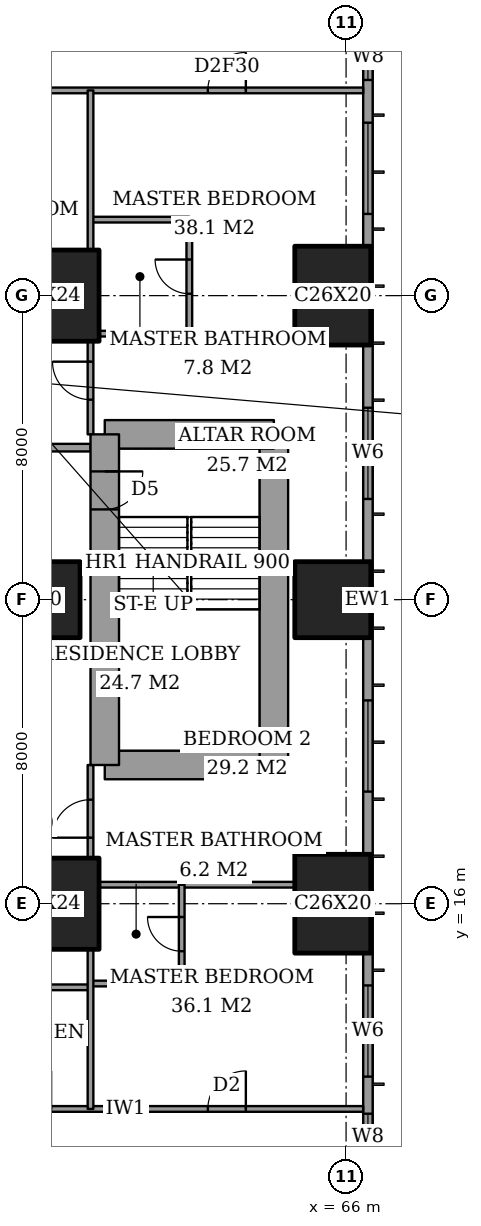
"""IFC4 building model, lengths in metres.
Left out: names, types, materials, properties, quantities, classifications, styles, units other than length and angle.
Written with IfcOpenShell. Run it as: python <this file> out.ifc"""

import sys

from ifc_helpers import new_model, si_unit, direction, frame, frame_2d, origin, origin_2d, place, context, subcontext, project, spatial, rectangle, extrude, element, fill, save


model = new_model("IFC4")
c1 = context("Model", 3, precision=1e-05, world=origin(), true_north=direction((0.0, 1.0)))
c2 = subcontext(c1, "Body", "Model", "MODEL_VIEW")
j1 = project(units=[si_unit("LENGTHUNIT", "METRE"), si_unit("PLANEANGLEUNIT", "RADIAN")], contexts=[c1])
p1 = place(None, origin())
s1 = spatial("IfcSite", under=j1, at=p1, CompositionType="ELEMENT")
p2 = place(p1, origin())
s2 = spatial("IfcBuilding", under=s1, at=p2, CompositionType="ELEMENT")
p3 = place(p2, frame((0.0, 0.0, 29.6)))
s3 = spatial("IfcBuildingStorey", under=s2, at=p3, CompositionType="ELEMENT", Elevation=29.6)
p4 = place(p3, frame((58.0, 16.0, 0.0), z_axis=(0.0, 0.0, 1.0), x_axis=(1.0, 0.0, 0.0)))
e1 = element("IfcColumn", 1, at=p4, inside=s3, PredefinedType="COLUMN", context=c2, shape_type="SweptSolid", body=[
    extrude(rectangle(XDim=3.0, YDim=2.4, at=origin_2d()), origin(), (0.0, 0.0, 1.0), 3.6),
])
p5 = place(p3, frame((58.0, 24.0, 0.0), z_axis=(0.0, 0.0, 1.0), x_axis=(1.0, 0.0, 0.0)))
e2 = element("IfcColumn", 2, at=p5, inside=s3, PredefinedType="COLUMN", context=c2, shape_type="SweptSolid", body=[
    extrude(rectangle(XDim=2.0, YDim=2.0, at=origin_2d()), origin(), (0.0, 0.0, 1.0), 3.6),
])
p6 = place(p3, frame((58.0, 32.0, 0.0), z_axis=(0.0, 0.0, 1.0), x_axis=(1.0, 0.0, 0.0)))
e3 = element("IfcColumn", 3, at=p6, inside=s3, PredefinedType="COLUMN", context=c2, shape_type="SweptSolid", body=[
    extrude(rectangle(XDim=3.0, YDim=2.4, at=origin_2d()), origin(), (0.0, 0.0, 1.0), 3.6),
])
p7 = place(p3, frame((65.65, 16.0, 0.0), z_axis=(0.0, 0.0, 1.0), x_axis=(0.0, 1.0, 0.0)))
e4 = element("IfcColumn", 4, at=p7, inside=s3, PredefinedType="COLUMN", context=c2, shape_type="SweptSolid", body=[
    extrude(rectangle(XDim=2.6, YDim=2.0, at=origin_2d()), origin(), (0.0, 0.0, 1.0), 3.6),
])
p8 = place(p3, frame((65.65, 24.0, 0.0), z_axis=(0.0, 0.0, 1.0), x_axis=(1.0, 0.0, 0.0)))
e5 = element("IfcColumn", 5, at=p8, inside=s3, PredefinedType="COLUMN", context=c2, shape_type="SweptSolid", body=[
    extrude(rectangle(XDim=2.0, YDim=2.0, at=origin_2d()), origin(), (0.0, 0.0, 1.0), 3.6),
])
p9 = place(p3, frame((65.65, 32.0, 0.0), z_axis=(0.0, 0.0, 1.0), x_axis=(0.0, 1.0, 0.0)))
e6 = element("IfcColumn", 6, at=p9, inside=s3, PredefinedType="COLUMN", context=c2, shape_type="SweptSolid", body=[
    extrude(rectangle(XDim=2.6, YDim=2.0, at=origin_2d()), origin(), (0.0, 0.0, 1.0), 3.6),
])
p10 = place(p3, frame((59.65, 19.65, 0.0), z_axis=(0.0, 0.0, 1.0), x_axis=(1.0, 0.0, 0.0)))
e7 = element("IfcWall", 7, at=p10, inside=s3, PredefinedType="SHEAR", context=c2, shape_type="SweptSolid", body=[
    extrude(rectangle(XDim=4.45, YDim=0.75, at=frame_2d((2.225, 0.0))), origin(), (0.0, 0.0, 1.0), 3.6),
])
p11 = place(p3, frame((64.1, 19.65, 0.0), z_axis=(0.0, 0.0, 1.0), x_axis=(0.0, 1.0, 0.0)))
e8 = element("IfcWall", 8, at=p11, inside=s3, PredefinedType="SHEAR", context=c2, shape_type="SweptSolid", body=[
    extrude(rectangle(XDim=8.7, YDim=0.75, at=frame_2d((4.35, 0.0))), origin(), (0.0, 0.0, 1.0), 3.6),
])
p12 = place(p3, frame((64.1, 28.35, 0.0), z_axis=(0.0, 0.0, 1.0), x_axis=(-1.0, 0.0, 0.0)))
e9 = element("IfcWall", 9, at=p12, inside=s3, PredefinedType="SHEAR", context=c2, shape_type="SweptSolid", body=[
    extrude(rectangle(XDim=4.45, YDim=0.75, at=frame_2d((2.225, 0.0))), origin(), (0.0, 0.0, 1.0), 3.6),
])
p13 = place(p3, frame((59.65, 28.35, 0.0), z_axis=(0.0, 0.0, 1.0), x_axis=(0.0, -1.0, 0.0)))
e10 = element("IfcWall", 10, at=p13, inside=s3, PredefinedType="SHEAR", context=c2, shape_type="SweptSolid", body=[
    extrude(rectangle(XDim=8.7, YDim=0.75, at=frame_2d((4.35, 0.0))), origin(), (0.0, 0.0, 1.0), 3.6),
])
p14 = place(p13, frame((0.975, 0.0, 0.0)))
e11 = element("IfcOpeningElement", 11, at=p14, cuts=e10, PredefinedType="OPENING", context=c2, shape_type="SweptSolid", body=[
    extrude(rectangle(XDim=1.0, YDim=2.1, at=frame_2d((0.5, 1.05))), frame((0.0, 0.385, 0.0), z_axis=(0.0, -1.0, 0.0), x_axis=(1.0, 0.0, 0.0)), (0.0, 0.0, 1.0), 0.77),
])
p15 = place(p3, frame((66.575, 3.175, 0.0), z_axis=(0.0, 0.0, 1.0), x_axis=(0.0, 1.0, 0.0)))
e12 = element("IfcWall", 12, at=p15, inside=s3, PredefinedType="SOLIDWALL", context=c2, shape_type="SweptSolid", body=[
    extrude(rectangle(XDim=41.65, YDim=0.25, at=frame_2d((20.825, 0.0))), origin(), (0.0, 0.0, 1.0), 3.6),
])
p16 = place(p15, frame((0.775, 0.0, 0.6)))
e13 = element("IfcOpeningElement", 13, at=p16, cuts=e12, PredefinedType="OPENING", context=c2, shape_type="SweptSolid", body=[
    extrude(rectangle(XDim=2.4, YDim=2.0, at=frame_2d((1.2, 1.0))), frame((0.0, 0.135, 0.0), z_axis=(0.0, -1.0, 0.0), x_axis=(1.0, 0.0, 0.0)), (0.0, 0.0, 1.0), 0.27),
])
p17 = place(p15, frame((6.1, 0.0, 0.6)))
e14 = element("IfcOpeningElement", 14, at=p17, cuts=e12, PredefinedType="OPENING", context=c2, shape_type="SweptSolid", body=[
    extrude(rectangle(XDim=1.2, YDim=2.0, at=frame_2d((0.6, 1.0))), frame((0.0, 0.135, 0.0), z_axis=(0.0, -1.0, 0.0), x_axis=(1.0, 0.0, 0.0)), (0.0, 0.0, 1.0), 0.27),
])
p18 = place(p15, frame((8.275, 0.0, 0.6)))
e15 = element("IfcOpeningElement", 15, at=p18, cuts=e12, PredefinedType="OPENING", context=c2, shape_type="SweptSolid", body=[
    extrude(rectangle(XDim=2.4, YDim=2.0, at=frame_2d((1.2, 1.0))), frame((0.0, 0.135, 0.0), z_axis=(0.0, -1.0, 0.0), x_axis=(1.0, 0.0, 0.0)), (0.0, 0.0, 1.0), 0.27),
])
p19 = place(p15, frame((15.775, 0.0, 0.6)))
e16 = element("IfcOpeningElement", 16, at=p19, cuts=e12, PredefinedType="OPENING", context=c2, shape_type="SweptSolid", body=[
    extrude(rectangle(XDim=2.4, YDim=2.0, at=frame_2d((1.2, 1.0))), frame((0.0, 0.135, 0.0), z_axis=(0.0, -1.0, 0.0), x_axis=(1.0, 0.0, 0.0)), (0.0, 0.0, 1.0), 0.27),
])
p20 = place(p15, frame((23.475, 0.0, 0.6)))
e17 = element("IfcOpeningElement", 17, at=p20, cuts=e12, PredefinedType="OPENING", context=c2, shape_type="SweptSolid", body=[
    extrude(rectangle(XDim=2.4, YDim=2.0, at=frame_2d((1.2, 1.0))), frame((0.0, 0.135, 0.0), z_axis=(0.0, -1.0, 0.0), x_axis=(1.0, 0.0, 0.0)), (0.0, 0.0, 1.0), 0.27),
])
p21 = place(p15, frame((30.975, 0.0, 0.6)))
e18 = element("IfcOpeningElement", 18, at=p21, cuts=e12, PredefinedType="OPENING", context=c2, shape_type="SweptSolid", body=[
    extrude(rectangle(XDim=2.4, YDim=2.0, at=frame_2d((1.2, 1.0))), frame((0.0, 0.135, 0.0), z_axis=(0.0, -1.0, 0.0), x_axis=(1.0, 0.0, 0.0)), (0.0, 0.0, 1.0), 0.27),
])
p22 = place(p15, frame((34.5, 0.0, 0.6)))
e19 = element("IfcOpeningElement", 19, at=p22, cuts=e12, PredefinedType="OPENING", context=c2, shape_type="SweptSolid", body=[
    extrude(rectangle(XDim=1.2, YDim=2.0, at=frame_2d((0.6, 1.0))), frame((0.0, 0.135, 0.0), z_axis=(0.0, -1.0, 0.0), x_axis=(1.0, 0.0, 0.0)), (0.0, 0.0, 1.0), 0.27),
])
p23 = place(p15, frame((38.475, 0.0, 0.6)))
e20 = element("IfcOpeningElement", 20, at=p23, cuts=e12, PredefinedType="OPENING", context=c2, shape_type="SweptSolid", body=[
    extrude(rectangle(XDim=2.4, YDim=2.0, at=frame_2d((1.2, 1.0))), frame((0.0, 0.135, 0.0), z_axis=(0.0, -1.0, 0.0), x_axis=(1.0, 0.0, 0.0)), (0.0, 0.0, 1.0), 0.27),
])
p24 = place(p3, frame((41.439, 10.6, 0.0), z_axis=(0.0, 0.0, 1.0), x_axis=(1.0, 0.0, 0.0)))
e21 = element("IfcWall", 21, at=p24, inside=s3, PredefinedType="PARTITIONING", context=c2, shape_type="SweptSolid", body=[
    extrude(rectangle(XDim=25.011, YDim=0.15, at=frame_2d((12.505, 0.0))), origin(), (0.0, 0.0, 1.0), 3.35),
])
p25 = place(p24, frame((10.761, 0.0, 0.0)))
e22 = element("IfcOpeningElement", 22, at=p25, cuts=e21, PredefinedType="OPENING", context=c2, shape_type="SweptSolid", body=[
    extrude(rectangle(XDim=1.0, YDim=2.1, at=frame_2d((0.5, 1.05))), frame((0.0, 0.085, 0.0), z_axis=(0.0, -1.0, 0.0), x_axis=(1.0, 0.0, 0.0)), (0.0, 0.0, 1.0), 0.17),
])
p26 = place(p24, frame((20.924, 0.0, 0.0)))
e23 = element("IfcOpeningElement", 23, at=p26, cuts=e21, PredefinedType="OPENING", context=c2, shape_type="SweptSolid", body=[
    extrude(rectangle(XDim=1.0, YDim=2.1, at=frame_2d((0.5, 1.05))), frame((0.0, 0.085, 0.0), z_axis=(0.0, -1.0, 0.0), x_axis=(1.0, 0.0, 0.0)), (0.0, 0.0, 1.0), 0.17),
])
p27 = place(p24, frame((15.799, 0.0, 0.0)))
e24 = element("IfcOpeningElement", 24, at=p27, cuts=e21, PredefinedType="OPENING", context=c2, shape_type="SweptSolid", body=[
    extrude(rectangle(XDim=1.0, YDim=2.1, at=frame_2d((0.5, 1.05))), frame((0.0, 0.085, 0.0), z_axis=(0.0, -1.0, 0.0), x_axis=(1.0, 0.0, 0.0)), (0.0, 0.0, 1.0), 0.17),
])
p28 = place(p24, frame((13.061, 0.0, 0.0)))
e25 = element("IfcOpeningElement", 25, at=p28, cuts=e21, PredefinedType="OPENING", context=c2, shape_type="SweptSolid", body=[
    extrude(rectangle(XDim=1.0, YDim=2.1, at=frame_2d((0.5, 1.05))), frame((0.0, 0.085, 0.0), z_axis=(0.0, -1.0, 0.0), x_axis=(1.0, 0.0, 0.0)), (0.0, 0.0, 1.0), 0.17),
])
p29 = place(p24, frame((7.911, 0.0, 0.0)))
e26 = element("IfcOpeningElement", 26, at=p29, cuts=e21, PredefinedType="OPENING", context=c2, shape_type="SweptSolid", body=[
    extrude(rectangle(XDim=0.9, YDim=2.1, at=frame_2d((0.45, 1.05))), frame((0.0, 0.085, 0.0), z_axis=(0.0, -1.0, 0.0), x_axis=(1.0, 0.0, 0.0)), (0.0, 0.0, 1.0), 0.17),
])
p30 = place(p24, frame((2.836, 0.0, 0.0)))
e27 = element("IfcOpeningElement", 27, at=p30, cuts=e21, PredefinedType="OPENING", context=c2, shape_type="SweptSolid", body=[
    extrude(rectangle(XDim=1.0, YDim=2.1, at=frame_2d((0.5, 1.05))), frame((0.0, 0.085, 0.0), z_axis=(0.0, -1.0, 0.0), x_axis=(1.0, 0.0, 0.0)), (0.0, 0.0, 1.0), 0.17),
])
p31 = place(p3, frame((56.2, 13.8, 0.0), z_axis=(0.0, 0.0, 1.0), x_axis=(1.0, 0.0, 0.0)))
e28 = element("IfcWall", 28, at=p31, inside=s3, PredefinedType="PARTITIONING", context=c2, shape_type="SweptSolid", body=[
    extrude(rectangle(XDim=3.075, YDim=0.15, at=frame_2d((1.538, 0.0))), origin(), (0.0, 0.0, 1.0), 3.35),
])
p32 = place(p3, frame((59.275, 13.9, 0.0), z_axis=(0.0, 0.0, 1.0), x_axis=(1.0, 0.0, 0.0)))
e29 = element("IfcWall", 29, at=p32, inside=s3, PredefinedType="PARTITIONING", context=c2, shape_type="SweptSolid", body=[
    extrude(rectangle(XDim=2.4, YDim=0.15, at=frame_2d((1.2, 0.0))), origin(), (0.0, 0.0, 1.0), 3.35),
])
p33 = place(p3, frame((59.5, 16.5, 0.0), z_axis=(0.0, 0.0, 1.0), x_axis=(1.0, 0.0, 0.0)))
e30 = element("IfcWall", 30, at=p33, inside=s3, PredefinedType="PARTITIONING", context=c2, shape_type="SweptSolid", body=[
    extrude(rectangle(XDim=5.15, YDim=0.15, at=frame_2d((2.575, 0.0))), origin(), (0.0, 0.0, 1.0), 3.35),
])
p34 = place(p3, frame((42.0, 28.0, 0.0), z_axis=(0.0, 0.0, 1.0), x_axis=(1.0, 0.0, 0.0)))
e31 = element("IfcWall", 31, at=p34, inside=s3, PredefinedType="PARTITIONING", context=c2, shape_type="SweptSolid", body=[
    extrude(rectangle(XDim=17.275, YDim=0.2, at=frame_2d((8.637, 0.0))), origin(), (0.0, 0.0, 1.0), 3.35),
])
p35 = place(p34, frame((8.9, 0.0, 0.0)))
e32 = element("IfcOpeningElement", 32, at=p35, cuts=e31, PredefinedType="OPENING", context=c2, shape_type="SweptSolid", body=[
    extrude(rectangle(XDim=1.2, YDim=2.4, at=frame_2d((0.6, 1.2))), frame((0.0, 0.11, 0.0), z_axis=(0.0, -1.0, 0.0), x_axis=(1.0, 0.0, 0.0)), (0.0, 0.0, 1.0), 0.22),
])
p36 = place(p3, frame((59.5, 31.0, 0.0), z_axis=(0.0, 0.0, 1.0), x_axis=(1.0, 0.0, 0.0)))
e33 = element("IfcWall", 33, at=p36, inside=s3, PredefinedType="PARTITIONING", context=c2, shape_type="SweptSolid", body=[
    extrude(rectangle(XDim=5.15, YDim=0.15, at=frame_2d((2.575, 0.0))), origin(), (0.0, 0.0, 1.0), 3.35),
])
p37 = place(p3, frame((59.275, 34.0, 0.0), z_axis=(0.0, 0.0, 1.0), x_axis=(1.0, 0.0, 0.0)))
e34 = element("IfcWall", 34, at=p37, inside=s3, PredefinedType="PARTITIONING", context=c2, shape_type="SweptSolid", body=[
    extrude(rectangle(XDim=2.6, YDim=0.15, at=frame_2d((1.3, 0.0))), origin(), (0.0, 0.0, 1.0), 3.35),
])
p38 = place(p3, frame((41.439, 37.4, 0.0), z_axis=(0.0, 0.0, 1.0), x_axis=(1.0, 0.0, 0.0)))
e35 = element("IfcWall", 35, at=p38, inside=s3, PredefinedType="PARTITIONING", context=c2, shape_type="SweptSolid", body=[
    extrude(rectangle(XDim=25.011, YDim=0.15, at=frame_2d((12.505, 0.0))), origin(), (0.0, 0.0, 1.0), 3.35),
])
p39 = place(p38, frame((11.961, 0.0, 0.0)))
e36 = element("IfcOpeningElement", 36, at=p39, cuts=e35, PredefinedType="OPENING", context=c2, shape_type="SweptSolid", body=[
    extrude(rectangle(XDim=1.0, YDim=2.1, at=frame_2d((0.5, 1.05))), frame((0.0, 0.085, 0.0), z_axis=(0.0, -1.0, 0.0), x_axis=(1.0, 0.0, 0.0)), (0.0, 0.0, 1.0), 0.17),
])
p40 = place(p38, frame((20.924, 0.0, 0.0)))
e37 = element("IfcOpeningElement", 37, at=p40, cuts=e35, PredefinedType="OPENING", context=c2, shape_type="SweptSolid", body=[
    extrude(rectangle(XDim=1.0, YDim=2.1, at=frame_2d((0.5, 1.05))), frame((0.0, 0.085, 0.0), z_axis=(0.0, -1.0, 0.0), x_axis=(1.0, 0.0, 0.0)), (0.0, 0.0, 1.0), 0.17),
])
p41 = place(p38, frame((15.249, 0.0, 0.0)))
e38 = element("IfcOpeningElement", 38, at=p41, cuts=e35, PredefinedType="OPENING", context=c2, shape_type="SweptSolid", body=[
    extrude(rectangle(XDim=0.9, YDim=2.1, at=frame_2d((0.45, 1.05))), frame((0.0, 0.085, 0.0), z_axis=(0.0, -1.0, 0.0), x_axis=(1.0, 0.0, 0.0)), (0.0, 0.0, 1.0), 0.17),
])
p42 = place(p38, frame((9.561, 0.0, 0.0)))
e39 = element("IfcOpeningElement", 39, at=p42, cuts=e35, PredefinedType="OPENING", context=c2, shape_type="SweptSolid", body=[
    extrude(rectangle(XDim=1.0, YDim=2.1, at=frame_2d((0.5, 1.05))), frame((0.0, 0.085, 0.0), z_axis=(0.0, -1.0, 0.0), x_axis=(1.0, 0.0, 0.0)), (0.0, 0.0, 1.0), 0.17),
])
p43 = place(p38, frame((7.161, 0.0, 0.0)))
e40 = element("IfcOpeningElement", 40, at=p43, cuts=e35, PredefinedType="OPENING", context=c2, shape_type="SweptSolid", body=[
    extrude(rectangle(XDim=1.0, YDim=2.1, at=frame_2d((0.5, 1.05))), frame((0.0, 0.085, 0.0), z_axis=(0.0, -1.0, 0.0), x_axis=(1.0, 0.0, 0.0)), (0.0, 0.0, 1.0), 0.17),
])
p44 = place(p38, frame((2.836, 0.0, 0.0)))
e41 = element("IfcOpeningElement", 41, at=p44, cuts=e35, PredefinedType="OPENING", context=c2, shape_type="SweptSolid", body=[
    extrude(rectangle(XDim=1.0, YDim=2.1, at=frame_2d((0.5, 1.05))), frame((0.0, 0.085, 0.0), z_axis=(0.0, -1.0, 0.0), x_axis=(1.0, 0.0, 0.0)), (0.0, 0.0, 1.0), 0.17),
])
p45 = place(p3, frame((59.275, 10.6, 0.0), z_axis=(0.0, 0.0, 1.0), x_axis=(0.0, 1.0, 0.0)))
e42 = element("IfcWall", 42, at=p45, inside=s3, PredefinedType="PARTITIONING", context=c2, shape_type="SweptSolid", body=[
    extrude(rectangle(XDim=4.2, YDim=0.15, at=frame_2d((2.1, 0.0))), origin(), (0.0, 0.0, 1.0), 3.35),
])
p46 = place(p3, frame((59.275, 17.2, 0.0), z_axis=(0.0, 0.0, 1.0), x_axis=(0.0, 1.0, 0.0)))
e43 = element("IfcWall", 43, at=p46, inside=s3, PredefinedType="PARTITIONING", context=c2, shape_type="SweptSolid", body=[
    extrude(rectangle(XDim=2.45, YDim=0.15, at=frame_2d((1.225, 0.0))), origin(), (0.0, 0.0, 1.0), 3.35),
])
p47 = place(p46, frame((0.538, 0.0, 0.0)))
e44 = element("IfcOpeningElement", 44, at=p47, cuts=e43, PredefinedType="OPENING", context=c2, shape_type="SweptSolid", body=[
    extrude(rectangle(XDim=1.0, YDim=2.1, at=frame_2d((0.5, 1.05))), frame((0.0, 0.085, 0.0), z_axis=(0.0, -1.0, 0.0), x_axis=(1.0, 0.0, 0.0)), (0.0, 0.0, 1.0), 0.17),
])
p48 = place(p3, frame((59.275, 28.35, 0.0), z_axis=(0.0, 0.0, 1.0), x_axis=(0.0, 1.0, 0.0)))
e45 = element("IfcWall", 45, at=p48, inside=s3, PredefinedType="PARTITIONING", context=c2, shape_type="SweptSolid", body=[
    extrude(rectangle(XDim=2.45, YDim=0.15, at=frame_2d((1.225, 0.0))), origin(), (0.0, 0.0, 1.0), 3.35),
])
p49 = place(p48, frame((0.913, 0.0, 0.0)))
e46 = element("IfcOpeningElement", 46, at=p49, cuts=e45, PredefinedType="OPENING", context=c2, shape_type="SweptSolid", body=[
    extrude(rectangle(XDim=1.0, YDim=2.1, at=frame_2d((0.5, 1.05))), frame((0.0, 0.085, 0.0), z_axis=(0.0, -1.0, 0.0), x_axis=(1.0, 0.0, 0.0)), (0.0, 0.0, 1.0), 0.17),
])
p50 = place(p3, frame((59.275, 33.2, 0.0), z_axis=(0.0, 0.0, 1.0), x_axis=(0.0, 1.0, 0.0)))
e47 = element("IfcWall", 47, at=p50, inside=s3, PredefinedType="PARTITIONING", context=c2, shape_type="SweptSolid", body=[
    extrude(rectangle(XDim=4.2, YDim=0.15, at=frame_2d((2.1, 0.0))), origin(), (0.0, 0.0, 1.0), 3.35),
])
p51 = place(p3, frame((61.675, 13.9, 0.0), z_axis=(0.0, 0.0, 1.0), x_axis=(0.0, 1.0, 0.0)))
e48 = element("IfcWall", 48, at=p51, inside=s3, PredefinedType="PARTITIONING", context=c2, shape_type="SweptSolid", body=[
    extrude(rectangle(XDim=2.6, YDim=0.15, at=frame_2d((1.3, 0.0))), origin(), (0.0, 0.0, 1.0), 3.35),
])
p52 = place(p51, frame((0.85, 0.0, 0.0)))
e49 = element("IfcOpeningElement", 49, at=p52, cuts=e48, PredefinedType="OPENING", context=c2, shape_type="SweptSolid", body=[
    extrude(rectangle(XDim=0.9, YDim=2.1, at=frame_2d((0.45, 1.05))), frame((0.0, 0.085, 0.0), z_axis=(0.0, -1.0, 0.0), x_axis=(1.0, 0.0, 0.0)), (0.0, 0.0, 1.0), 0.17),
])
p53 = place(p3, frame((61.875, 31.0, 0.0), z_axis=(0.0, 0.0, 1.0), x_axis=(0.0, 1.0, 0.0)))
e50 = element("IfcWall", 50, at=p53, inside=s3, PredefinedType="PARTITIONING", context=c2, shape_type="SweptSolid", body=[
    extrude(rectangle(XDim=3.0, YDim=0.15, at=frame_2d((1.5, 0.0))), origin(), (0.0, 0.0, 1.0), 3.35),
])
p54 = place(p53, frame((1.05, 0.0, 0.0)))
e51 = element("IfcOpeningElement", 51, at=p54, cuts=e50, PredefinedType="OPENING", context=c2, shape_type="SweptSolid", body=[
    extrude(rectangle(XDim=0.9, YDim=2.1, at=frame_2d((0.45, 1.05))), frame((0.0, 0.085, 0.0), z_axis=(0.0, -1.0, 0.0), x_axis=(1.0, 0.0, 0.0)), (0.0, 0.0, 1.0), 0.17),
])
p55 = place(p17, origin())
e52 = element("IfcWindow", 52, at=p55, inside=s3, PartitioningType="SINGLE_PANEL", PredefinedType="WINDOW", context=c2, shape_type="SweptSolid", body=[
    extrude(rectangle(XDim=1.2, YDim=2.0, at=frame_2d((0.6, 1.0))), frame((0.0, 0.03, 0.0), z_axis=(0.0, -1.0, 0.0), x_axis=(1.0, 0.0, 0.0)), (0.0, 0.0, 1.0), 0.06),
])
fill(e14, e52)
p56 = place(p18, origin())
e53 = element("IfcWindow", 53, at=p56, inside=s3, PartitioningType="SINGLE_PANEL", PredefinedType="WINDOW", context=c2, shape_type="SweptSolid", body=[
    extrude(rectangle(XDim=2.4, YDim=2.0, at=frame_2d((1.2, 1.0))), frame((0.0, 0.03, 0.0), z_axis=(0.0, -1.0, 0.0), x_axis=(1.0, 0.0, 0.0)), (0.0, 0.0, 1.0), 0.06),
])
fill(e15, e53)
p57 = place(p19, origin())
e54 = element("IfcWindow", 54, at=p57, inside=s3, PartitioningType="SINGLE_PANEL", PredefinedType="WINDOW", context=c2, shape_type="SweptSolid", body=[
    extrude(rectangle(XDim=2.4, YDim=2.0, at=frame_2d((1.2, 1.0))), frame((0.0, 0.03, 0.0), z_axis=(0.0, -1.0, 0.0), x_axis=(1.0, 0.0, 0.0)), (0.0, 0.0, 1.0), 0.06),
])
fill(e16, e54)
p58 = place(p20, origin())
e55 = element("IfcWindow", 55, at=p58, inside=s3, PartitioningType="SINGLE_PANEL", PredefinedType="WINDOW", context=c2, shape_type="SweptSolid", body=[
    extrude(rectangle(XDim=2.4, YDim=2.0, at=frame_2d((1.2, 1.0))), frame((0.0, 0.03, 0.0), z_axis=(0.0, -1.0, 0.0), x_axis=(1.0, 0.0, 0.0)), (0.0, 0.0, 1.0), 0.06),
])
fill(e17, e55)
p59 = place(p21, origin())
e56 = element("IfcWindow", 56, at=p59, inside=s3, PartitioningType="SINGLE_PANEL", PredefinedType="WINDOW", context=c2, shape_type="SweptSolid", body=[
    extrude(rectangle(XDim=2.4, YDim=2.0, at=frame_2d((1.2, 1.0))), frame((0.0, 0.03, 0.0), z_axis=(0.0, -1.0, 0.0), x_axis=(1.0, 0.0, 0.0)), (0.0, 0.0, 1.0), 0.06),
])
fill(e18, e56)
p60 = place(p22, origin())
e57 = element("IfcWindow", 57, at=p60, inside=s3, PartitioningType="SINGLE_PANEL", PredefinedType="WINDOW", context=c2, shape_type="SweptSolid", body=[
    extrude(rectangle(XDim=1.2, YDim=2.0, at=frame_2d((0.6, 1.0))), frame((0.0, 0.03, 0.0), z_axis=(0.0, -1.0, 0.0), x_axis=(1.0, 0.0, 0.0)), (0.0, 0.0, 1.0), 0.06),
])
fill(e19, e57)
p61 = place(p52, origin())
e58 = element("IfcDoor", 58, at=p61, inside=s3, OperationType="SINGLE_SWING_LEFT", PredefinedType="DOOR", context=c2, shape_type="SweptSolid", body=[
    extrude(rectangle(XDim=0.9, YDim=2.1, at=frame_2d((0.45, 1.05))), frame((0.0, 0.025, 0.0), z_axis=(0.0, -1.0, 0.0), x_axis=(1.0, 0.0, 0.0)), (0.0, 0.0, 1.0), 0.05),
])
fill(e49, e58)
p62 = place(p26, origin())
e59 = element("IfcDoor", 59, at=p62, inside=s3, OperationType="SINGLE_SWING_LEFT", PredefinedType="DOOR", context=c2, shape_type="SweptSolid", body=[
    extrude(rectangle(XDim=1.0, YDim=2.1, at=frame_2d((0.5, 1.05))), frame((0.0, 0.025, 0.0), z_axis=(0.0, -1.0, 0.0), x_axis=(1.0, 0.0, 0.0)), (0.0, 0.0, 1.0), 0.05),
])
fill(e23, e59)
p63 = place(p47, origin())
e60 = element("IfcDoor", 60, at=p63, inside=s3, OperationType="SINGLE_SWING_RIGHT", PredefinedType="DOOR", context=c2, shape_type="SweptSolid", body=[
    extrude(rectangle(XDim=1.0, YDim=2.1, at=frame_2d((0.5, 1.05))), frame((0.0, 0.025, 0.0), z_axis=(0.0, -1.0, 0.0), x_axis=(1.0, 0.0, 0.0)), (0.0, 0.0, 1.0), 0.05),
])
fill(e44, e60)
p64 = place(p54, origin())
e61 = element("IfcDoor", 61, at=p64, inside=s3, OperationType="SINGLE_SWING_LEFT", PredefinedType="DOOR", context=c2, shape_type="SweptSolid", body=[
    extrude(rectangle(XDim=0.9, YDim=2.1, at=frame_2d((0.45, 1.05))), frame((0.0, 0.025, 0.0), z_axis=(0.0, -1.0, 0.0), x_axis=(1.0, 0.0, 0.0)), (0.0, 0.0, 1.0), 0.05),
])
fill(e51, e61)
p65 = place(p40, origin())
e62 = element("IfcDoor", 62, at=p65, inside=s3, OperationType="SINGLE_SWING_LEFT", PredefinedType="DOOR", context=c2, shape_type="SweptSolid", body=[
    extrude(rectangle(XDim=1.0, YDim=2.1, at=frame_2d((0.5, 1.05))), frame((0.0, 0.025, 0.0), z_axis=(0.0, -1.0, 0.0), x_axis=(1.0, 0.0, 0.0)), (0.0, 0.0, 1.0), 0.05),
])
fill(e37, e62)
p66 = place(p49, origin())
e63 = element("IfcDoor", 63, at=p66, inside=s3, OperationType="SINGLE_SWING_LEFT", PredefinedType="DOOR", context=c2, shape_type="SweptSolid", body=[
    extrude(rectangle(XDim=1.0, YDim=2.1, at=frame_2d((0.5, 1.05))), frame((0.0, 0.025, 0.0), z_axis=(0.0, -1.0, 0.0), x_axis=(1.0, 0.0, 0.0)), (0.0, 0.0, 1.0), 0.05),
])
fill(e46, e63)
p67 = place(p14, origin())
e64 = element("IfcDoor", 64, at=p67, inside=s3, OperationType="SINGLE_SWING_RIGHT", PredefinedType="DOOR", context=c2, shape_type="SweptSolid", body=[
    extrude(rectangle(XDim=1.0, YDim=2.1, at=frame_2d((0.5, 1.05))), frame((0.0, 0.025, 0.0), z_axis=(0.0, -1.0, 0.0), x_axis=(1.0, 0.0, 0.0)), (0.0, 0.0, 1.0), 0.05),
])
fill(e11, e64)
save(model, sys.argv[1])
